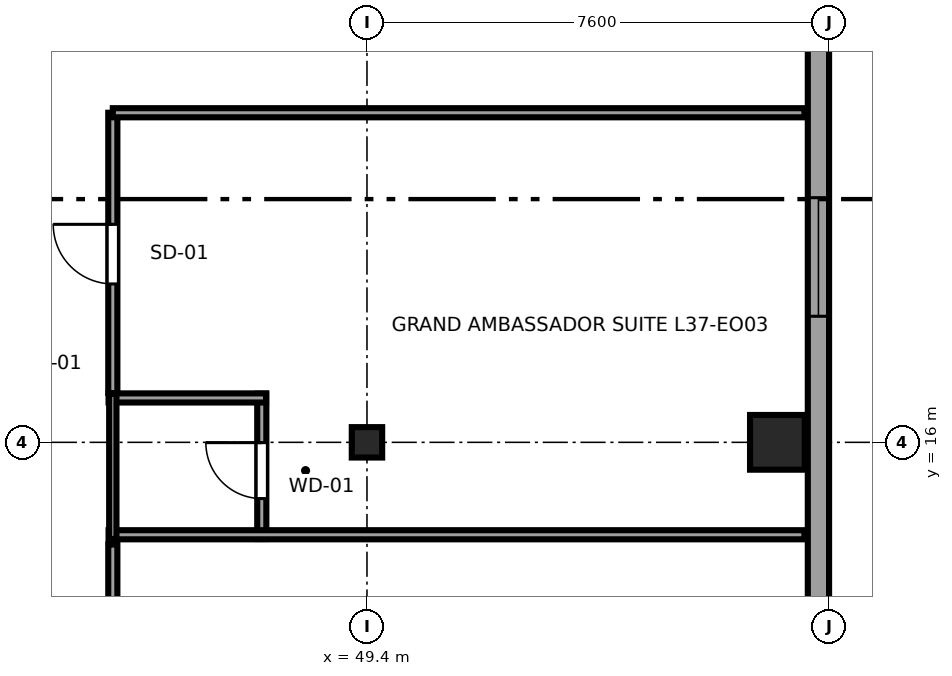
"""IFC4 building model, lengths in metres.
Left out: names, types, materials, properties, quantities, classifications, styles, units other than length and angle.
Written with IfcOpenShell. Run it as: python <this file> out.ifc"""

import sys

from ifc_helpers import new_model, si_unit, direction, frame, frame_2d, origin, origin_2d, place, context, subcontext, project, spatial, rectangle, i_section, extrude, source, transform, mapped, element, fill, save


model = new_model("IFC4")
c1 = context("Model", 3, precision=1e-05, world=origin(), true_north=direction((0.0, 1.0)))
c2 = subcontext(c1, "Body", "Model", "MODEL_VIEW")
j1 = project(units=[si_unit("LENGTHUNIT", "METRE"), si_unit("PLANEANGLEUNIT", "RADIAN")], contexts=[c1])
p1 = place(None, origin())
s1 = spatial("IfcSite", under=j1, at=p1, CompositionType="ELEMENT")
p2 = place(p1, origin())
s2 = spatial("IfcBuilding", under=s1, at=p2, CompositionType="ELEMENT")
p3 = place(p2, frame((0.0, 0.0, 143.5)))
s3 = spatial("IfcBuildingStorey", under=s2, at=p3, CompositionType="ELEMENT", Elevation=143.5)
m1 = source(origin(), c2, "Body", "SweptSolid", [
    extrude(i_section(OverallWidth=0.5, OverallDepth=0.5, WebThickness=0.022, FlangeThickness=0.034, at=origin_2d()), origin(), (0.0, 0.0, 1.0), 3.55),
])
p4 = place(p3, frame((49.4, 16.0, 0.0), z_axis=(0.0, 0.0, 1.0), x_axis=(1.0, 0.0, 0.0)))
e1 = element("IfcColumn", 1, at=p4, inside=s3, PredefinedType="COLUMN", context=c2, shape_type="MappedRepresentation", body=[
    mapped(m1, transform((0.0, 0.0, 0.0), x_axis=(1.0, 0.0, 0.0), y_axis=(0.0, 1.0, 0.0), z_axis=(0.0, 0.0, 1.0), scale=1.0)),
])
m2 = source(origin(), c2, "Body", "SweptSolid", [
    extrude(rectangle(XDim=0.9, YDim=0.9, at=origin_2d()), origin(), (0.0, 0.0, 1.0), 3.55),
])
p5 = place(p3, frame((56.15, 16.0, 0.0), z_axis=(0.0, 0.0, 1.0), x_axis=(1.0, 0.0, 0.0)))
e2 = element("IfcColumn", 2, at=p5, inside=s3, PredefinedType="COLUMN", context=c2, shape_type="MappedRepresentation", body=[
    mapped(m2, transform((0.0, 0.0, 0.0), x_axis=(1.0, 0.0, 0.0), y_axis=(0.0, 1.0, 0.0), z_axis=(0.0, 0.0, 1.0), scale=1.0)),
])
p6 = place(p3, frame((56.825, 4.617, 0.0), z_axis=(0.0, 0.0, 1.0), x_axis=(0.0, 1.0, 0.0)))
e3 = element("IfcWall", 3, at=p6, inside=s3, PredefinedType="SOLIDWALL", context=c2, shape_type="SweptSolid", body=[
    extrude(rectangle(XDim=36.766, YDim=0.35, at=frame_2d((18.383, 0.0))), origin(), (0.0, 0.0, 1.0), 3.29),
])
p7 = place(p6, frame((5.553, 0.0, 0.68)))
e4 = element("IfcOpeningElement", 4, at=p7, cuts=e3, PredefinedType="OPENING", context=c2, shape_type="SweptSolid", body=[
    extrude(rectangle(XDim=1.95, YDim=1.82, at=frame_2d((0.975, 0.91))), frame((0.0, 0.185, 0.0), z_axis=(0.0, -1.0, 0.0), x_axis=(1.0, 0.0, 0.0)), (0.0, 0.0, 1.0), 0.37),
])
p8 = place(p6, frame((13.456, 0.0, 0.68)))
e5 = element("IfcOpeningElement", 5, at=p8, cuts=e3, PredefinedType="OPENING", context=c2, shape_type="SweptSolid", body=[
    extrude(rectangle(XDim=1.95, YDim=1.82, at=frame_2d((0.975, 0.91))), frame((0.0, 0.185, 0.0), z_axis=(0.0, -1.0, 0.0), x_axis=(1.0, 0.0, 0.0)), (0.0, 0.0, 1.0), 0.37),
])
p9 = place(p6, frame((21.36, 0.0, 0.68)))
e6 = element("IfcOpeningElement", 6, at=p9, cuts=e3, PredefinedType="OPENING", context=c2, shape_type="SweptSolid", body=[
    extrude(rectangle(XDim=1.95, YDim=1.82, at=frame_2d((0.975, 0.91))), frame((0.0, 0.185, 0.0), z_axis=(0.0, -1.0, 0.0), x_axis=(1.0, 0.0, 0.0)), (0.0, 0.0, 1.0), 0.37),
])
p10 = place(p6, frame((30.313, 0.0, 0.68)))
e7 = element("IfcOpeningElement", 7, at=p10, cuts=e3, PredefinedType="OPENING", context=c2, shape_type="SweptSolid", body=[
    extrude(rectangle(XDim=1.95, YDim=1.82, at=frame_2d((0.975, 0.91))), frame((0.0, 0.185, 0.0), z_axis=(0.0, -1.0, 0.0), x_axis=(1.0, 0.0, 0.0)), (0.0, 0.0, 1.0), 0.37),
])
p11 = place(p3, frame((47.67, 14.41, 0.0), z_axis=(0.0, 0.0, 1.0), x_axis=(0.0, 1.0, 0.0)))
e8 = element("IfcWall", 8, at=p11, inside=s3, PredefinedType="PARTITIONING", context=c2, shape_type="SweptSolid", body=[
    extrude(rectangle(XDim=2.39, YDim=0.15, at=frame_2d((1.195, 0.0))), origin(), (0.0, 0.0, 1.0), 3.29),
])
p12 = place(p11, frame((0.665, 0.0, 0.0)))
e9 = element("IfcOpeningElement", 9, at=p12, cuts=e8, PredefinedType="OPENING", context=c2, shape_type="SweptSolid", body=[
    extrude(rectangle(XDim=0.92, YDim=2.01, at=frame_2d((0.46, 1.005))), frame((0.0, 0.085, 0.0), z_axis=(0.0, -1.0, 0.0), x_axis=(1.0, 0.0, 0.0)), (0.0, 0.0, 1.0), 0.17),
])
p13 = place(p3, frame((45.15, 14.48, 0.0), z_axis=(0.0, 0.0, 1.0), x_axis=(1.0, 0.0, 0.0)))
e10 = element("IfcWall", 10, at=p13, inside=s3, PredefinedType="PARTITIONING", context=c2, shape_type="SweptSolid", body=[
    extrude(rectangle(XDim=11.445, YDim=0.15, at=frame_2d((5.723, 0.0))), origin(), (0.0, 0.0, 1.0), 3.29),
])
p14 = place(p3, frame((45.15, 16.73, 0.0), z_axis=(0.0, 0.0, 1.0), x_axis=(1.0, 0.0, 0.0)))
e11 = element("IfcWall", 11, at=p14, inside=s3, PredefinedType="PARTITIONING", context=c2, shape_type="SweptSolid", body=[
    extrude(rectangle(XDim=2.59, YDim=0.15, at=frame_2d((1.295, 0.0))), origin(), (0.0, 0.0, 1.0), 3.29),
])
p15 = place(p3, frame((45.22, 14.41, 0.0), z_axis=(0.0, 0.0, 1.0), x_axis=(0.0, 1.0, 0.0)))
e12 = element("IfcWall", 12, at=p15, inside=s3, PredefinedType="PLUMBINGWALL", context=c2, shape_type="SweptSolid", body=[
    extrude(rectangle(XDim=2.39, YDim=0.12, at=frame_2d((1.195, 0.0))), origin(), (0.0, 0.0, 1.0), 3.29),
])
p16 = place(p3, frame((45.22, 9.61, 0.0), z_axis=(0.0, 0.0, 1.0), x_axis=(0.0, 1.0, 0.0)))
e13 = element("IfcWall", 13, at=p16, inside=s3, PredefinedType="PARTITIONING", context=c2, shape_type="SweptSolid", body=[
    extrude(rectangle(XDim=4.71, YDim=0.15, at=frame_2d((2.355, 0.0))), origin(), (0.0, 0.0, 1.0), 3.29),
])
p17 = place(p16, frame((1.845, 0.0, 0.0)))
e14 = element("IfcOpeningElement", 14, at=p17, cuts=e13, PredefinedType="OPENING", context=c2, shape_type="SweptSolid", body=[
    extrude(rectangle(XDim=0.98, YDim=2.12, at=frame_2d((0.49, 1.06))), frame((0.0, 0.085, 0.0), z_axis=(0.0, -1.0, 0.0), x_axis=(1.0, 0.0, 0.0)), (0.0, 0.0, 1.0), 0.17),
])
p18 = place(p3, frame((45.22, 16.81, 0.0), z_axis=(0.0, 0.0, 1.0), x_axis=(0.0, 1.0, 0.0)))
e15 = element("IfcWall", 15, at=p18, inside=s3, PredefinedType="PARTITIONING", context=c2, shape_type="SweptSolid", body=[
    extrude(rectangle(XDim=4.61, YDim=0.15, at=frame_2d((2.305, 0.0))), origin(), (0.0, 0.0, 1.0), 3.29),
])
p19 = place(p18, frame((1.795, 0.0, 0.0)))
e16 = element("IfcOpeningElement", 16, at=p19, cuts=e15, PredefinedType="OPENING", context=c2, shape_type="SweptSolid", body=[
    extrude(rectangle(XDim=0.98, YDim=2.12, at=frame_2d((0.49, 1.06))), frame((0.0, 0.085, 0.0), z_axis=(0.0, -1.0, 0.0), x_axis=(1.0, 0.0, 0.0)), (0.0, 0.0, 1.0), 0.17),
])
p20 = place(p3, frame((45.22, 21.42, 0.0), z_axis=(0.0, 0.0, 1.0), x_axis=(1.0, 0.0, 0.0)))
e17 = element("IfcWall", 17, at=p20, inside=s3, PredefinedType="PARTITIONING", context=c2, shape_type="SweptSolid", body=[
    extrude(rectangle(XDim=11.375, YDim=0.15, at=frame_2d((5.688, 0.0))), origin(), (0.0, 0.0, 1.0), 3.29),
])
m3 = source(origin(), c2, "Body", "SweptSolid", [
    extrude(rectangle(XDim=1.95, YDim=1.82, at=frame_2d((0.975, 0.91))), frame((0.0, 0.09, 0.0), z_axis=(0.0, -1.0, 0.0), x_axis=(1.0, 0.0, 0.0)), (0.0, 0.0, 1.0), 0.06),
])
p21 = place(p8, origin())
e18 = element("IfcWindow", 18, at=p21, inside=s3, PartitioningType="DOUBLE_PANEL_VERTICAL", PredefinedType="WINDOW", context=c2, shape_type="MappedRepresentation", body=[
    mapped(m3, transform((0.0, 0.0, 0.0), x_axis=(1.0, 0.0, 0.0), y_axis=(0.0, 1.0, 0.0), z_axis=(0.0, 0.0, 1.0), scale=1.0)),
])
fill(e5, e18)
m4 = source(origin(), c2, "Body", "SweptSolid", [
    extrude(rectangle(XDim=0.92, YDim=2.01, at=frame_2d((0.46, 1.005))), frame((0.0, 0.025, 0.0), z_axis=(0.0, -1.0, 0.0), x_axis=(1.0, 0.0, 0.0)), (0.0, 0.0, 1.0), 0.05),
])
p22 = place(p12, origin())
e19 = element("IfcDoor", 19, at=p22, inside=s3, OperationType="SINGLE_SWING_RIGHT", PredefinedType="DOOR", context=c2, shape_type="MappedRepresentation", body=[
    mapped(m4, transform((0.0, 0.0, 0.0), x_axis=(1.0, 0.0, 0.0), y_axis=(0.0, 1.0, 0.0), z_axis=(0.0, 0.0, 1.0), scale=1.0)),
])
fill(e9, e19)
m5 = source(origin(), c2, "Body", "SweptSolid", [
    extrude(rectangle(XDim=0.98, YDim=2.12, at=frame_2d((0.49, 1.06))), frame((0.0, 0.025, 0.0), z_axis=(0.0, -1.0, 0.0), x_axis=(1.0, 0.0, 0.0)), (0.0, 0.0, 1.0), 0.05),
])
p23 = place(p19, origin())
e20 = element("IfcDoor", 20, at=p23, inside=s3, OperationType="SINGLE_SWING_RIGHT", PredefinedType="DOOR", context=c2, shape_type="MappedRepresentation", body=[
    mapped(m5, transform((0.0, 0.0, 0.0), x_axis=(1.0, 0.0, 0.0), y_axis=(0.0, 1.0, 0.0), z_axis=(0.0, 0.0, 1.0), scale=1.0)),
])
fill(e16, e20)
save(model, sys.argv[1])
